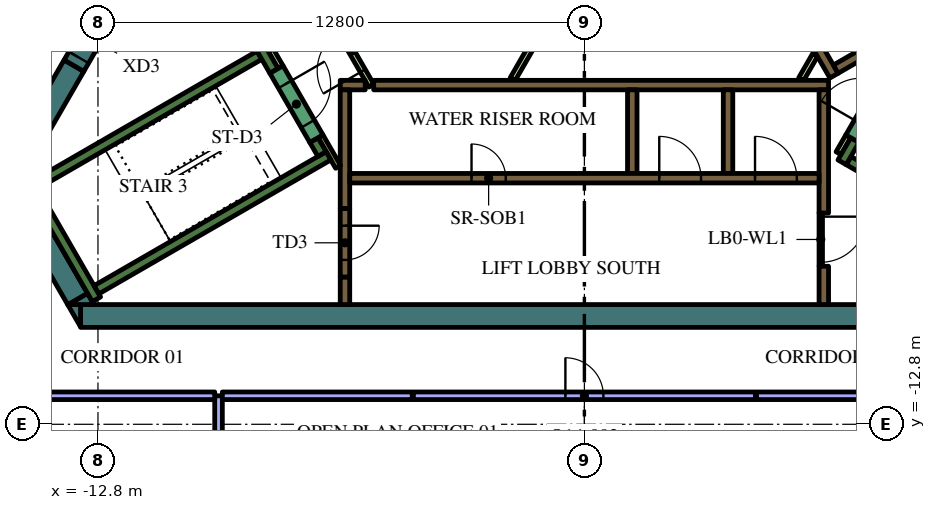
"""IFC4 building model, lengths in metres.
Left out: names, types, materials, properties, quantities, classifications, styles, units other than length and angle.
Written with IfcOpenShell. Run it as: python <this file> out.ifc"""

import sys

from ifc_helpers import new_model, si_unit, direction, frame, frame_2d, origin, place, context, subcontext, project, spatial, polyline, rectangle, outline, extrude, element, fill, save


model = new_model("IFC4")
c1 = context("Model", 3, precision=1e-05, world=origin(), true_north=direction((0.0, 1.0)))
c2 = subcontext(c1, "Body", "Model", "MODEL_VIEW")
j1 = project(units=[si_unit("LENGTHUNIT", "METRE"), si_unit("PLANEANGLEUNIT", "RADIAN")], contexts=[c1])
p1 = place(None, origin())
s1 = spatial("IfcSite", under=j1, at=p1, CompositionType="ELEMENT")
p2 = place(p1, origin())
s2 = spatial("IfcBuilding", under=s1, at=p2, CompositionType="ELEMENT")
p3 = place(p2, frame((0.0, 0.0, 313.2)))
s3 = spatial("IfcBuildingStorey", under=s2, at=p3, CompositionType="ELEMENT", Elevation=313.2)
p4 = place(p3, frame((8.904, -9.95, 0.0), z_axis=(0.0, 0.0, 1.0), x_axis=(-1.0, 0.0, 0.0)))
e1 = element("IfcWall", 1, at=p4, inside=s3, PredefinedType="SOLIDWALL", context=c2, shape_type="SweptSolid", body=[
    extrude(rectangle(XDim=22.161, YDim=0.6, at=frame_2d((11.081, 0.0))), origin(), (0.0, 0.0, 1.0), 4.2),
])
p5 = place(p3, origin())
e2 = element("IfcWall", 2, at=p5, inside=s3, PredefinedType="SOLIDWALL", context=c2, shape_type="SweptSolid", body=[
    extrude(outline(polyline([(-13.597, -9.65), (-13.259, -9.65), (-13.259, -10.236), (-13.597, -9.65)])), origin(), (0.0, 0.0, 1.0), 4.2),
])
p6 = place(p3, frame((-13.333, -9.506, 0.0), z_axis=(0.0, 0.0, 1.0), x_axis=(-0.500019073792, 0.866014391245, 0.0)))
e3 = element("IfcWall", 3, at=p6, inside=s3, PredefinedType="SOLIDWALL", context=c2, shape_type="SweptSolid", body=[
    extrude(rectangle(XDim=3.823, YDim=0.6, at=frame_2d((1.912, 0.0))), origin(), (0.0, 0.0, 1.0), 4.2),
])
e4 = element("IfcWall", 4, at=p5, inside=s3, PredefinedType="SOLIDWALL", context=c2, shape_type="SweptSolid", body=[
    extrude(outline(polyline([(-12.904, -9.65), (-13.58, -9.65), (-13.073, -9.357), (-12.904, -9.65)])), origin(), (0.0, 0.0, 1.0), 4.2),
])
p7 = place(p3, frame((-13.432, -3.364, 0.0), z_axis=(0.0, 0.0, 1.0), x_axis=(-0.499960127962, -0.866048422692, 0.0)))
e5 = element("IfcWall", 5, at=p7, inside=s3, PredefinedType="SOLIDWALL", context=c2, shape_type="SweptSolid", body=[
    extrude(rectangle(XDim=2.934, YDim=0.6, at=frame_2d((1.467, 0.0))), origin(), (0.0, 0.0, 1.0), 4.2),
])
p8 = place(p3, frame((12.84, -9.261, 0.0), z_axis=(0.0, 0.0, 1.0), x_axis=(-0.866013990052, 0.500019768644, 0.0)))
e6 = element("IfcWall", 6, at=p8, inside=s3, PredefinedType="SOLIDWALL", context=c2, shape_type="SweptSolid", body=[
    extrude(rectangle(XDim=6.8, YDim=0.25, at=frame_2d((3.4, 0.0))), origin(), (0.0, 0.0, 1.0), 4.2),
])
p9 = place(p3, frame((6.78, -5.906, 0.0), z_axis=(0.0, 0.0, 1.0), x_axis=(0.500223362819, 0.865896406789, 0.0)))
e7 = element("IfcWall", 7, at=p9, inside=s3, PredefinedType="SOLIDWALL", context=c2, shape_type="SweptSolid", body=[
    extrude(rectangle(XDim=0.675, YDim=0.25, at=frame_2d((0.337, 0.0))), origin(), (0.0, 0.0, 1.0), 4.2),
])
p10 = place(p3, frame((-12.84, -9.511, 0.0), z_axis=(0.0, 0.0, 1.0), x_axis=(-0.499997733992, 0.866026712061, 0.0)))
e8 = element("IfcWall", 8, at=p10, inside=s3, PredefinedType="SOLIDWALL", context=c2, shape_type="SweptSolid", body=[
    extrude(rectangle(XDim=3.634, YDim=0.25, at=frame_2d((1.817, 0.0))), origin(), (0.0, 0.0, 1.0), 4.2),
])
p11 = place(p3, frame((-14.44, -6.49, 0.0), z_axis=(0.0, 0.0, 1.0), x_axis=(0.866022966069, 0.500004222222, 0.0)))
e9 = element("IfcWall", 9, at=p11, inside=s3, PredefinedType="SOLIDWALL", context=c2, shape_type="SweptSolid", body=[
    extrude(rectangle(XDim=6.8, YDim=0.25, at=frame_2d((3.4, 0.0))), origin(), (0.0, 0.0, 1.0), 4.2),
])
p12 = place(p3, frame((-8.168, -3.503, 0.0), z_axis=(0.0, 0.0, 1.0), x_axis=(-0.499952099219, 0.866053057547, 0.0)))
e10 = element("IfcWall", 10, at=p12, inside=s3, PredefinedType="SOLIDWALL", context=c2, shape_type="SweptSolid", body=[
    extrude(rectangle(XDim=0.675, YDim=0.25, at=frame_2d((0.337, 0.0))), origin(), (0.0, 0.0, 1.0), 4.2),
])
p13 = place(p3, frame((-12.84, -9.261, 0.0), z_axis=(0.0, 0.0, 1.0), x_axis=(0.866016039709, 0.500016218704, 0.0)))
e11 = element("IfcWall", 11, at=p13, inside=s3, PredefinedType="SOLIDWALL", context=c2, shape_type="SweptSolid", body=[
    extrude(rectangle(XDim=7.05, YDim=0.25, at=frame_2d((3.525, 0.0))), origin(), (0.0, 0.0, 1.0), 4.2),
])
p14 = place(p3, frame((-6.905, -5.69, 0.0), z_axis=(0.0, 0.0, 1.0), x_axis=(-0.500402024738, 0.865793170242, 0.0)))
e12 = element("IfcWall", 12, at=p14, inside=s3, PredefinedType="SOLIDWALL", context=c2, shape_type="SweptSolid", body=[
    extrude(rectangle(XDim=0.425, YDim=0.25, at=frame_2d((0.212, 0.0))), origin(), (0.0, 0.0, 1.0), 4.2),
])
p15 = place(p3, frame((-5.545, -3.875, 0.0), z_axis=(0.0, 0.0, 1.0), x_axis=(1.0, 0.0, 0.0)))
e13 = element("IfcWall", 13, at=p15, inside=s3, PredefinedType="SOLIDWALL", context=c2, shape_type="SweptSolid", body=[
    extrude(rectangle(XDim=11.97, YDim=0.25, at=frame_2d((5.985, 0.0))), origin(), (0.0, 0.0, 1.0), 4.2),
])
p16 = place(p3, frame((-6.425, -3.875, 0.0), z_axis=(0.0, 0.0, 1.0), x_axis=(1.0, 0.0, 0.0)))
e14 = element("IfcWall", 14, at=p16, inside=s3, PredefinedType="SOLIDWALL", context=c2, shape_type="SweptSolid", body=[
    extrude(rectangle(XDim=0.658, YDim=0.25, at=frame_2d((0.329, 0.0))), origin(), (0.0, 0.0, 1.0), 4.2),
])
p17 = place(p3, frame((6.3, -7.24, 0.0), z_axis=(0.0, 0.0, 1.0), x_axis=(0.0, 1.0, 0.0)))
e15 = element("IfcWall", 15, at=p17, inside=s3, PredefinedType="SOLIDWALL", context=c2, shape_type="SweptSolid", body=[
    extrude(rectangle(XDim=3.24, YDim=0.25, at=frame_2d((1.62, 0.0))), origin(), (0.0, 0.0, 1.0), 4.2),
])
p18 = place(p3, frame((6.3, -9.65, 0.0), z_axis=(0.0, 0.0, 1.0), x_axis=(0.0, 1.0, 0.0)))
e16 = element("IfcWall", 16, at=p18, inside=s3, PredefinedType="SOLIDWALL", context=c2, shape_type="SweptSolid", body=[
    extrude(rectangle(XDim=1.008, YDim=0.25, at=frame_2d((0.504, 0.0))), origin(), (0.0, 0.0, 1.0), 4.2),
])
for number, where, z_axis, x_axis in (
    (17, (3.78, -4.0, 0.0), (0.0, 0.0, 1.0), (0.0, -1.0, 0.0)),
    (18, (1.26, -4.0, 0.0), (0.0, 0.0, 1.0), (0.0, -1.0, 0.0)),
):
    element("IfcWall", number, at=place(p3, frame(where, z_axis=z_axis, x_axis=x_axis)), inside=s3, PredefinedType="SOLIDWALL", context=c2, shape_type="SweptSolid", body=[
        extrude(rectangle(XDim=2.2, YDim=0.25, at=frame_2d((1.1, 0.0))), origin(), (0.0, 0.0, 1.0), 4.2),
    ])
p19 = place(p3, frame((-6.3, -7.125, 0.0), z_axis=(0.0, 0.0, 1.0), x_axis=(0.0, 1.0, 0.0)))
e19 = element("IfcWall", 19, at=p19, inside=s3, PredefinedType="SOLIDWALL", context=c2, shape_type="SweptSolid", body=[
    extrude(rectangle(XDim=3.125, YDim=0.25, at=frame_2d((1.562, 0.0))), origin(), (0.0, 0.0, 1.0), 4.2),
])
p20 = place(p3, frame((-6.3, -8.925, 0.0), z_axis=(0.0, 0.0, 1.0), x_axis=(0.0, -1.0, 0.0)))
e20 = element("IfcWall", 20, at=p20, inside=s3, PredefinedType="SOLIDWALL", context=c2, shape_type="SweptSolid", body=[
    extrude(rectangle(XDim=0.725, YDim=0.25, at=frame_2d((0.363, 0.0))), origin(), (0.0, 0.0, 1.0), 4.2),
])
p21 = place(p3, frame((6.568, -3.627, 0.0), z_axis=(0.0, 0.0, 1.0), x_axis=(-0.499999455981, 0.866025717874, 0.0)))
e21 = element("IfcWall", 21, at=p21, inside=s3, PredefinedType="SOLIDWALL", context=c2, shape_type="SweptSolid", body=[
    extrude(rectangle(XDim=11.978, YDim=0.25, at=frame_2d((5.989, 0.0))), origin(), (0.0, 0.0, 1.0), 4.2),
])
p22 = place(p3, frame((6.614, -3.456, 0.0), z_axis=(0.0, 0.0, 1.0), x_axis=(0.866032512851, 0.499987686533, 0.0)))
e22 = element("IfcWall", 22, at=p22, inside=s3, PredefinedType="SOLIDWALL", context=c2, shape_type="SweptSolid", body=[
    extrude(rectangle(XDim=2.975, YDim=0.25, at=frame_2d((1.487, 0.0))), origin(), (0.0, 0.0, 1.0), 4.2),
])
p23 = place(p3, frame((-8.252, -2.958, 0.0), z_axis=(0.0, 0.0, 1.0), x_axis=(0.500174715838, -0.865924508047, 0.0)))
e23 = element("IfcWall", 23, at=p23, inside=s3, PredefinedType="PARTITIONING", context=c2, shape_type="SweptSolid", body=[
    extrude(rectangle(XDim=0.514, YDim=0.15, at=frame_2d((0.257, 0.0))), origin(), (0.0, 0.0, 1.0), 3.55),
])
p24 = place(p3, frame((-6.48, -6.027, 0.0), z_axis=(0.0, 0.0, 1.0), x_axis=(-0.499927229454, 0.866067413802, 0.0)))
e24 = element("IfcWall", 24, at=p24, inside=s3, PredefinedType="PARTITIONING", context=c2, shape_type="SweptSolid", body=[
    extrude(rectangle(XDim=0.929, YDim=0.15, at=frame_2d((0.464, 0.0))), origin(), (0.0, 0.0, 1.0), 4.2),
])
p25 = place(p3, frame((6.945, -5.222, 0.0), z_axis=(0.0, 0.0, 1.0), x_axis=(-0.499818422106, -0.866130212453, 0.0)))
e25 = element("IfcWall", 25, at=p25, inside=s3, PredefinedType="PARTITIONING", context=c2, shape_type="SweptSolid", body=[
    extrude(rectangle(XDim=0.514, YDim=0.15, at=frame_2d((0.257, 0.0))), origin(), (0.0, 0.0, 1.0), 3.55),
])
p26 = place(p3, frame((5.705, -3.718, 0.0), z_axis=(0.0, 0.0, 1.0), x_axis=(0.499962090823, 0.866047289552, 0.0)))
e26 = element("IfcWall", 26, at=p26, inside=s3, PredefinedType="PARTITIONING", context=c2, shape_type="SweptSolid", body=[
    extrude(rectangle(XDim=0.735, YDim=0.15, at=frame_2d((0.367, 0.0))), origin(), (0.0, 0.0, 1.0), 3.55),
])
p27 = place(p3, frame((-1.887, -3.718, 0.0), z_axis=(0.0, 0.0, 1.0), x_axis=(0.500043732237, 0.866000153493, 0.0)))
e27 = element("IfcWall", 27, at=p27, inside=s3, PredefinedType="PARTITIONING", context=c2, shape_type="SweptSolid", body=[
    extrude(rectangle(XDim=3.114, YDim=0.15, at=frame_2d((1.557, 0.0))), origin(), (0.0, 0.0, 1.0), 3.55),
])
p28 = place(p3, frame((-6.175, -6.325, 0.0), z_axis=(0.0, 0.0, 1.0), x_axis=(1.0, 0.0, 0.0)))
e28 = element("IfcWall", 28, at=p28, inside=s3, PredefinedType="SOLIDWALL", context=c2, shape_type="SweptSolid", body=[
    extrude(rectangle(XDim=12.35, YDim=0.25, at=frame_2d((6.175, 0.0))), origin(), (0.0, 0.0, 1.0), 4.2),
])
p29 = place(p28, frame((3.205, 0.0, 0.0)))
e29 = element("IfcOpeningElement", 29, at=p29, cuts=e28, PredefinedType="OPENING", context=c2, shape_type="SweptSolid", body=[
    extrude(rectangle(XDim=0.9, YDim=2.1, at=frame_2d((0.45, 1.05))), frame((0.0, 0.135, 0.0), z_axis=(0.0, -1.0, 0.0), x_axis=(1.0, 0.0, 0.0)), (0.0, 0.0, 1.0), 0.27),
])
p30 = place(p28, frame((8.145, 0.0, 0.0)))
e30 = element("IfcOpeningElement", 30, at=p30, cuts=e28, PredefinedType="OPENING", context=c2, shape_type="SweptSolid", body=[
    extrude(rectangle(XDim=1.1, YDim=2.1, at=frame_2d((0.55, 1.05))), frame((0.0, 0.135, 0.0), z_axis=(0.0, -1.0, 0.0), x_axis=(1.0, 0.0, 0.0)), (0.0, 0.0, 1.0), 0.27),
])
p31 = place(p28, frame((10.665, 0.0, 0.0)))
e31 = element("IfcOpeningElement", 31, at=p31, cuts=e28, PredefinedType="OPENING", context=c2, shape_type="SweptSolid", body=[
    extrude(rectangle(XDim=1.1, YDim=2.1, at=frame_2d((0.55, 1.05))), frame((0.0, 0.135, 0.0), z_axis=(0.0, -1.0, 0.0), x_axis=(1.0, 0.0, 0.0)), (0.0, 0.0, 1.0), 0.27),
])
p32 = place(p3, frame((7.053, -5.284, 0.0), z_axis=(0.0, 0.0, 1.0), x_axis=(0.500078061341, 0.865980330357, 0.0)))
e32 = element("IfcWall", 32, at=p32, inside=s3, PredefinedType="SOLIDWALL", context=c2, shape_type="SweptSolid", body=[
    extrude(rectangle(XDim=2.1, YDim=0.4, at=frame_2d((1.05, 0.0))), origin(), (0.0, 0.0, 1.0), 4.2),
])
p33 = place(p32, frame((0.45, 0.0, 0.0)))
e33 = element("IfcOpeningElement", 33, at=p33, cuts=e32, PredefinedType="OPENING", context=c2, shape_type="SweptSolid", body=[
    extrude(rectangle(XDim=1.2, YDim=2.1, at=frame_2d((0.6, 1.05))), frame((0.0, 0.21, 0.0), z_axis=(0.0, -1.0, 0.0), x_axis=(1.0, 0.0, 0.0)), (0.0, 0.0, 1.0), 0.42),
])
p34 = place(p3, frame((-8.103, -3.466, 0.0), z_axis=(0.0, 0.0, 1.0), x_axis=(0.500078061341, -0.865980330357, 0.0)))
e34 = element("IfcWall", 34, at=p34, inside=s3, PredefinedType="SOLIDWALL", context=c2, shape_type="SweptSolid", body=[
    extrude(rectangle(XDim=2.1, YDim=0.4, at=frame_2d((1.05, 0.0))), origin(), (0.0, 0.0, 1.0), 4.2),
])
p35 = place(p34, frame((0.45, 0.0, 0.0)))
e35 = element("IfcOpeningElement", 35, at=p35, cuts=e34, PredefinedType="OPENING", context=c2, shape_type="SweptSolid", body=[
    extrude(rectangle(XDim=1.2, YDim=2.1, at=frame_2d((0.6, 1.05))), frame((0.0, 0.21, 0.0), z_axis=(0.0, -1.0, 0.0), x_axis=(1.0, 0.0, 0.0)), (0.0, 0.0, 1.0), 0.42),
])
p36 = place(p3, frame((-6.3, -7.125, 0.0), z_axis=(0.0, 0.0, 1.0), x_axis=(0.0, -1.0, 0.0)))
e36 = element("IfcWall", 36, at=p36, inside=s3, PredefinedType="SOLIDWALL", context=c2, shape_type="SweptSolid", body=[
    extrude(rectangle(XDim=1.8, YDim=0.25, at=frame_2d((0.9, 0.0))), origin(), (0.0, 0.0, 1.0), 4.2),
])
p37 = place(p36, frame((0.45, 0.0, 0.0)))
e37 = element("IfcOpeningElement", 37, at=p37, cuts=e36, PredefinedType="OPENING", context=c2, shape_type="SweptSolid", body=[
    extrude(rectangle(XDim=0.9, YDim=2.1, at=frame_2d((0.45, 1.05))), frame((0.0, 0.135, 0.0), z_axis=(0.0, -1.0, 0.0), x_axis=(1.0, 0.0, 0.0)), (0.0, 0.0, 1.0), 0.27),
])
p38 = place(p3, frame((-5.606, -3.89, 0.0), z_axis=(0.0, 0.0, 1.0), x_axis=(-0.500027713859, 0.866009402589, 0.0)))
e38 = element("IfcWall", 38, at=p38, inside=s3, PredefinedType="PARTITIONING", context=c2, shape_type="SweptSolid", body=[
    extrude(rectangle(XDim=2.1, YDim=0.15, at=frame_2d((1.05, 0.0))), origin(), (0.0, 0.0, 1.0), 3.55),
])
p39 = place(p38, frame((0.45, 0.0, 0.0)))
e39 = element("IfcOpeningElement", 39, at=p39, cuts=e38, PredefinedType="OPENING", context=c2, shape_type="SweptSolid", body=[
    extrude(rectangle(XDim=1.2, YDim=2.1, at=frame_2d((0.6, 1.05))), frame((0.0, 0.085, 0.0), z_axis=(0.0, -1.0, 0.0), x_axis=(1.0, 0.0, 0.0)), (0.0, 0.0, 1.0), 0.17),
])
p40 = place(p3, frame((6.22, -7.237, 0.0), z_axis=(0.0, 0.0, 1.0), x_axis=(0.0, -1.0, 0.0)))
e40 = element("IfcWall", 40, at=p40, inside=s3, PredefinedType="PARTITIONING", context=c2, shape_type="SweptSolid", body=[
    extrude(rectangle(XDim=1.4, YDim=0.09, at=frame_2d((0.7, 0.0))), origin(), (0.0, 0.0, 1.0), 3.55),
])
p41 = place(p40, frame((0.1, 0.0, 0.0)))
e41 = element("IfcOpeningElement", 41, at=p41, cuts=e40, PredefinedType="OPENING", context=c2, shape_type="SweptSolid", body=[
    extrude(rectangle(XDim=1.2, YDim=2.1, at=frame_2d((0.6, 1.05))), frame((0.0, 0.055, 0.0), z_axis=(0.0, -1.0, 0.0), x_axis=(1.0, 0.0, 0.0)), (0.0, 0.0, 1.0), 0.11),
])
p42 = place(p3, frame((-13.432, -3.364, 0.0), z_axis=(0.0, 0.0, 1.0), x_axis=(0.500062241894, 0.865989465428, 0.0)))
e42 = element("IfcWall", 42, at=p42, inside=s3, PredefinedType="SOLIDWALL", context=c2, shape_type="SweptSolid", body=[
    extrude(rectangle(XDim=1.7, YDim=0.6, at=frame_2d((0.85, 0.0))), origin(), (0.0, 0.0, 1.0), 4.2),
])
p43 = place(p42, frame((0.25, 0.0, 0.0)))
e43 = element("IfcOpeningElement", 43, at=p43, cuts=e42, PredefinedType="OPENING", context=c2, shape_type="SweptSolid", body=[
    extrude(rectangle(XDim=1.2, YDim=2.1, at=frame_2d((0.6, 1.05))), frame((0.0, 0.31, 0.0), z_axis=(0.0, -1.0, 0.0), x_axis=(1.0, 0.0, 0.0)), (0.0, 0.0, 1.0), 0.62),
])
p44 = place(p3, frame((-9.627, -15.132, 0.0), z_axis=(0.0, 0.0, 1.0), x_axis=(0.0, 1.0, 0.0)))
e44 = element("IfcWall", 44, at=p44, inside=s3, PredefinedType="PARTITIONING", context=c2, shape_type="SweptSolid", body=[
    extrude(rectangle(XDim=3.082, YDim=0.2, at=frame_2d((1.541, 0.0))), origin(), (0.0, 0.0, 1.0), 3.55),
])
p45 = place(p3, frame((-4.5, -12.05, 0.0), z_axis=(0.0, 0.0, 1.0), x_axis=(1.0, 0.0, 0.0)))
e45 = element("IfcWall", 45, at=p45, inside=s3, PredefinedType="PARTITIONING", context=c2, shape_type="SweptSolid", body=[
    extrude(rectangle(XDim=9.0, YDim=0.2, at=frame_2d((4.5, 0.0))), origin(), (0.0, 0.0, 1.0), 3.55),
])
p46 = place(p45, frame((4.0, 0.0, 0.0)))
e46 = element("IfcOpeningElement", 46, at=p46, cuts=e45, PredefinedType="OPENING", context=c2, shape_type="SweptSolid", body=[
    extrude(rectangle(XDim=1.0, YDim=2.1, at=frame_2d((0.5, 1.05))), frame((0.0, 0.11, 0.0), z_axis=(0.0, -1.0, 0.0), x_axis=(1.0, 0.0, 0.0)), (0.0, 0.0, 1.0), 0.22),
])
for number, where, z_axis, x_axis in (
    (47, (-9.527, -12.05, 0.0), (0.0, 0.0, 1.0), (1.0, 0.0, 0.0)),
    (48, (4.53, -12.05, 0.0), (0.0, 0.0, 1.0), (1.0, 0.0, 0.0)),
):
    element("IfcWall", number, at=place(p3, frame(where, z_axis=z_axis, x_axis=x_axis)), inside=s3, PredefinedType="PARTITIONING", context=c2, shape_type="SweptSolid", body=[
        extrude(rectangle(XDim=4.997, YDim=0.2, at=frame_2d((2.499, 0.0))), origin(), (0.0, 0.0, 1.0), 3.55),
    ])
p47 = place(p3, frame((-14.26, -12.05, 0.0), z_axis=(0.0, 0.0, 1.0), x_axis=(1.0, 0.0, 0.0)))
e49 = element("IfcWall", 49, at=p47, inside=s3, PredefinedType="PARTITIONING", context=c2, shape_type="SweptSolid", body=[
    extrude(rectangle(XDim=4.532, YDim=0.2, at=frame_2d((2.266, 0.0))), origin(), (0.0, 0.0, 1.0), 3.55),
])
p48 = place(p29, origin())
e50 = element("IfcDoor", 50, at=p48, inside=s3, OperationType="SINGLE_SWING_LEFT", PredefinedType="DOOR", context=c2, shape_type="SweptSolid", body=[
    extrude(rectangle(XDim=0.9, YDim=2.1, at=frame_2d((0.45, 1.05))), frame((0.0, 0.025, 0.0), z_axis=(0.0, -1.0, 0.0), x_axis=(1.0, 0.0, 0.0)), (0.0, 0.0, 1.0), 0.05),
])
fill(e29, e50)
p49 = place(p30, origin())
e51 = element("IfcDoor", 51, at=p49, inside=s3, OperationType="DOUBLE_DOOR_SLIDING", PredefinedType="DOOR", context=c2, shape_type="SweptSolid", body=[
    extrude(rectangle(XDim=1.1, YDim=2.1, at=frame_2d((0.55, 1.05))), frame((0.0, 0.025, 0.0), z_axis=(0.0, -1.0, 0.0), x_axis=(1.0, 0.0, 0.0)), (0.0, 0.0, 1.0), 0.05),
])
fill(e30, e51)
p50 = place(p31, origin())
e52 = element("IfcDoor", 52, at=p50, inside=s3, OperationType="DOUBLE_DOOR_SLIDING", PredefinedType="DOOR", context=c2, shape_type="SweptSolid", body=[
    extrude(rectangle(XDim=1.1, YDim=2.1, at=frame_2d((0.55, 1.05))), frame((0.0, 0.025, 0.0), z_axis=(0.0, -1.0, 0.0), x_axis=(1.0, 0.0, 0.0)), (0.0, 0.0, 1.0), 0.05),
])
fill(e31, e52)
p51 = place(p35, origin())
e53 = element("IfcDoor", 53, at=p51, inside=s3, OperationType="SINGLE_SWING_LEFT", PredefinedType="DOOR", context=c2, shape_type="SweptSolid", body=[
    extrude(rectangle(XDim=1.2, YDim=2.1, at=frame_2d((0.6, 1.05))), frame((0.0, 0.025, 0.0), z_axis=(0.0, -1.0, 0.0), x_axis=(1.0, 0.0, 0.0)), (0.0, 0.0, 1.0), 0.05),
])
fill(e35, e53)
p52 = place(p37, origin())
e54 = element("IfcDoor", 54, at=p52, inside=s3, OperationType="SINGLE_SWING_LEFT", PredefinedType="DOOR", context=c2, shape_type="SweptSolid", body=[
    extrude(rectangle(XDim=0.9, YDim=2.1, at=frame_2d((0.45, 1.05))), frame((0.0, 0.025, 0.0), z_axis=(0.0, -1.0, 0.0), x_axis=(1.0, 0.0, 0.0)), (0.0, 0.0, 1.0), 0.05),
])
fill(e37, e54)
p53 = place(p39, origin())
e55 = element("IfcDoor", 55, at=p53, inside=s3, OperationType="SINGLE_SWING_LEFT", PredefinedType="DOOR", context=c2, shape_type="SweptSolid", body=[
    extrude(rectangle(XDim=1.2, YDim=2.1, at=frame_2d((0.6, 1.05))), frame((0.0, 0.025, 0.0), z_axis=(0.0, -1.0, 0.0), x_axis=(1.0, 0.0, 0.0)), (0.0, 0.0, 1.0), 0.05),
])
fill(e39, e55)
p54 = place(p41, origin())
e56 = element("IfcDoor", 56, at=p54, inside=s3, OperationType="SINGLE_SWING_LEFT", PredefinedType="DOOR", context=c2, shape_type="SweptSolid", body=[
    extrude(rectangle(XDim=1.2, YDim=2.1, at=frame_2d((0.6, 1.05))), frame((0.0, 0.025, 0.0), z_axis=(0.0, -1.0, 0.0), x_axis=(1.0, 0.0, 0.0)), (0.0, 0.0, 1.0), 0.05),
])
fill(e41, e56)
p55 = place(p43, origin())
e57 = element("IfcDoor", 57, at=p55, inside=s3, OperationType="SINGLE_SWING_LEFT", PredefinedType="DOOR", context=c2, shape_type="SweptSolid", body=[
    extrude(rectangle(XDim=1.2, YDim=2.1, at=frame_2d((0.6, 1.05))), frame((0.0, 0.025, 0.0), z_axis=(0.0, -1.0, 0.0), x_axis=(1.0, 0.0, 0.0)), (0.0, 0.0, 1.0), 0.05),
])
fill(e43, e57)
p56 = place(p46, origin())
e58 = element("IfcDoor", 58, at=p56, inside=s3, OperationType="SINGLE_SWING_RIGHT", PredefinedType="DOOR", context=c2, shape_type="SweptSolid", body=[
    extrude(rectangle(XDim=1.0, YDim=2.1, at=frame_2d((0.5, 1.05))), frame((0.0, 0.025, 0.0), z_axis=(0.0, -1.0, 0.0), x_axis=(1.0, 0.0, 0.0)), (0.0, 0.0, 1.0), 0.05),
])
fill(e46, e58)
save(model, sys.argv[1])
